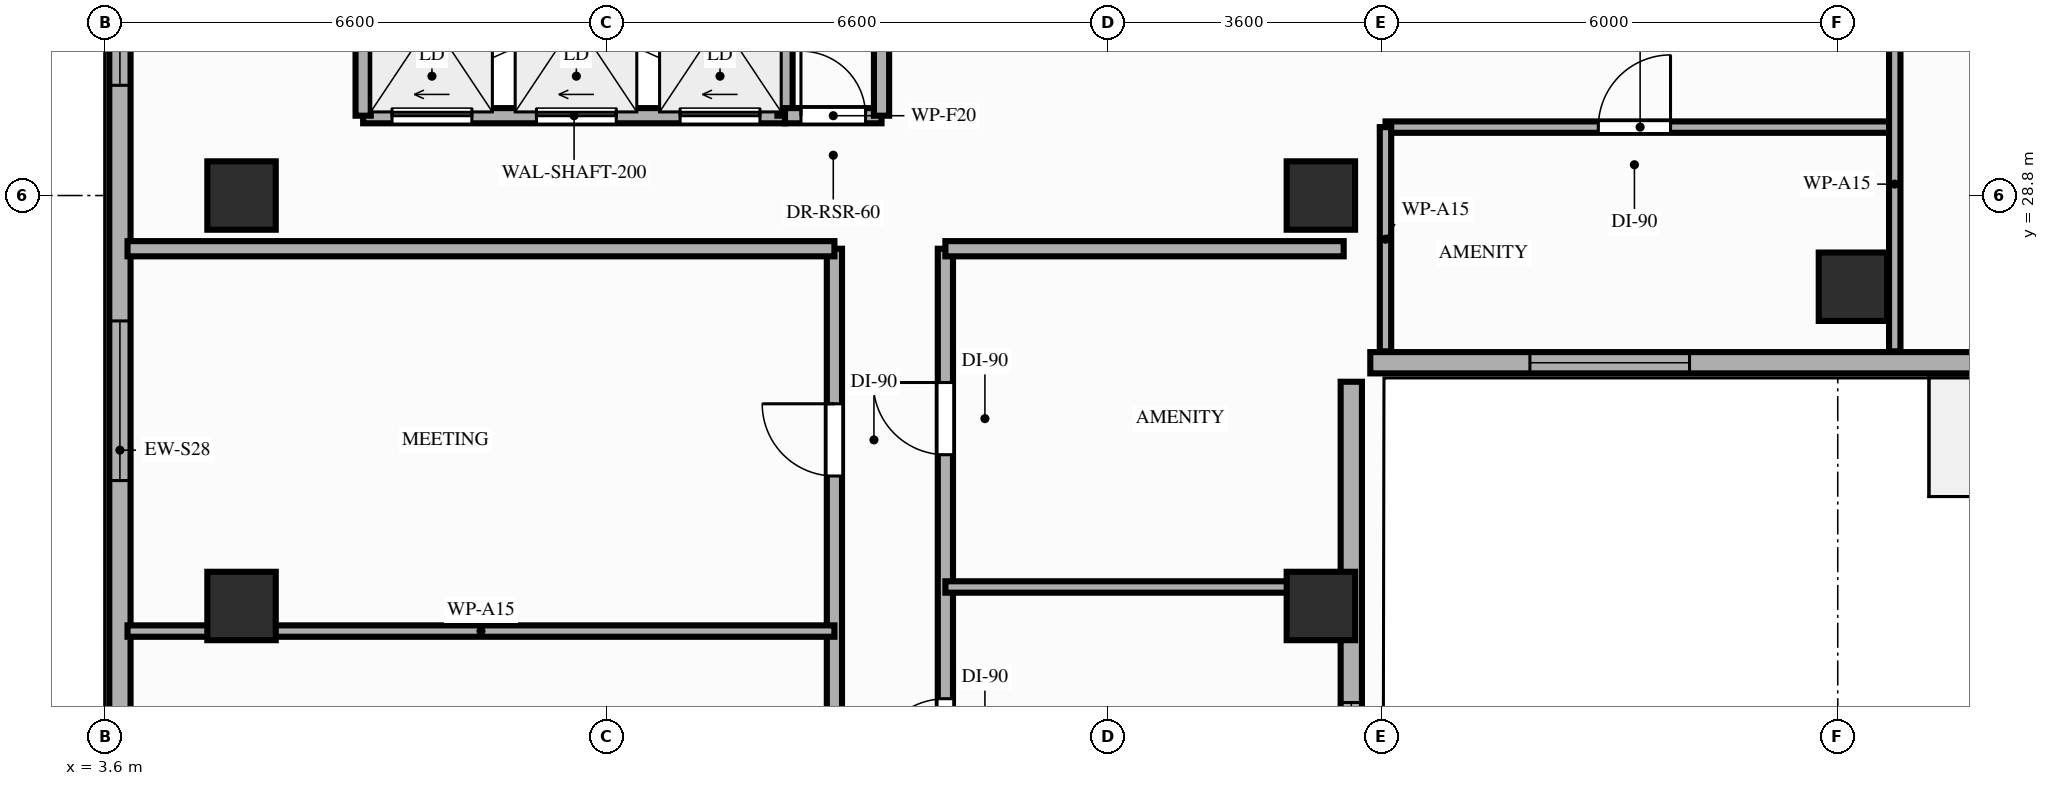
"""IFC4 building model, lengths in metres.
Left out: names, types, materials, properties, quantities, classifications, styles, units other than length and angle.
Written with IfcOpenShell. Run it as: python <this file> out.ifc"""

import sys

from ifc_helpers import new_model, si_unit, direction, frame, frame_2d, origin, origin_2d, place, context, subcontext, project, spatial, rectangle, extrude, element, fill, save


model = new_model("IFC4")
c1 = context("Model", 3, precision=1e-05, world=origin(), true_north=direction((0.0, 1.0)))
c2 = subcontext(c1, "Body", "Model", "MODEL_VIEW")
j1 = project(units=[si_unit("LENGTHUNIT", "METRE"), si_unit("PLANEANGLEUNIT", "RADIAN")], contexts=[c1])
p1 = place(None, origin())
s1 = spatial("IfcSite", under=j1, at=p1, CompositionType="ELEMENT")
p2 = place(p1, origin())
s2 = spatial("IfcBuilding", under=s1, at=p2, CompositionType="ELEMENT")
p3 = place(p2, frame((0.0, 0.0, 201.6)))
s3 = spatial("IfcBuildingStorey", under=s2, at=p3, CompositionType="ELEMENT", Elevation=201.6)
for number, where, z_axis, x_axis in (
    (1, (5.4, 23.4, 0.0), (0.0, 0.0, 1.0), (1.0, 0.0, 0.0)),
    (2, (19.6, 23.4, 0.0), (0.0, 0.0, 1.0), (1.0, 0.0, 0.0)),
    (3, (5.4, 28.8, 0.0), (0.0, 0.0, 1.0), (1.0, 0.0, 0.0)),
    (4, (19.6, 28.8, 0.0), (0.0, 0.0, 1.0), (1.0, 0.0, 0.0)),
    (5, (26.6, 27.6, 0.0), (0.0, 0.0, 1.0), (1.0, 0.0, 0.0)),
):
    element("IfcColumn", number, at=place(p3, frame(where, z_axis=z_axis, x_axis=x_axis)), inside=s3, PredefinedType="COLUMN", context=c2, shape_type="SweptSolid", body=[
        extrude(rectangle(XDim=0.9, YDim=0.9, at=origin_2d()), origin(), (0.0, 0.0, 1.0), 3.2),
    ])
p4 = place(p3, frame((3.8, 42.1, 0.0), z_axis=(0.0, 0.0, 1.0), x_axis=(0.0, -1.0, 0.0)))
e6 = element("IfcWall", 6, at=p4, inside=s3, PredefinedType="STANDARD", context=c2, shape_type="SweptSolid", body=[
    extrude(rectangle(XDim=33.3, YDim=0.28, at=frame_2d((16.65, 0.0))), origin(), (0.0, 0.0, 1.0), 2.71),
])
p5 = place(p4, frame((20.75, 0.0, 0.0)))
e7 = element("IfcOpeningElement", 7, at=p5, cuts=e6, PredefinedType="OPENING", context=c2, shape_type="SweptSolid", body=[
    extrude(rectangle(XDim=1.3, YDim=2.08, at=frame_2d((0.65, 1.04))), frame((0.0, 0.15, 0.0), z_axis=(0.0, -1.0, 0.0), x_axis=(1.0, 0.0, 0.0)), (0.0, 0.0, 1.0), 0.3),
])
p6 = place(p4, frame((29.33, 0.0, 0.85)))
e8 = element("IfcOpeningElement", 8, at=p6, cuts=e6, PredefinedType="OPENING", context=c2, shape_type="SweptSolid", body=[
    extrude(rectangle(XDim=2.1, YDim=1.61, at=frame_2d((1.05, 0.805))), frame((0.0, 0.15, 0.0), z_axis=(0.0, -1.0, 0.0), x_axis=(1.0, 0.0, 0.0)), (0.0, 0.0, 1.0), 0.3),
])
p7 = place(p4, frame((25.25, 0.0, 0.85)))
e9 = element("IfcOpeningElement", 9, at=p7, cuts=e6, PredefinedType="OPENING", context=c2, shape_type="SweptSolid", body=[
    extrude(rectangle(XDim=2.1, YDim=1.61, at=frame_2d((1.05, 0.805))), frame((0.0, 0.15, 0.0), z_axis=(0.0, -1.0, 0.0), x_axis=(1.0, 0.0, 0.0)), (0.0, 0.0, 1.0), 0.3),
])
p8 = place(p4, frame((14.95, 0.0, 0.85)))
e10 = element("IfcOpeningElement", 10, at=p8, cuts=e6, PredefinedType="OPENING", context=c2, shape_type="SweptSolid", body=[
    extrude(rectangle(XDim=2.1, YDim=1.61, at=frame_2d((1.05, 0.805))), frame((0.0, 0.15, 0.0), z_axis=(0.0, -1.0, 0.0), x_axis=(1.0, 0.0, 0.0)), (0.0, 0.0, 1.0), 0.3),
])
p9 = place(p4, frame((9.75, 0.0, 0.85)))
e11 = element("IfcOpeningElement", 11, at=p9, cuts=e6, PredefinedType="OPENING", context=c2, shape_type="SweptSolid", body=[
    extrude(rectangle(XDim=2.1, YDim=1.61, at=frame_2d((1.05, 0.805))), frame((0.0, 0.15, 0.0), z_axis=(0.0, -1.0, 0.0), x_axis=(1.0, 0.0, 0.0)), (0.0, 0.0, 1.0), 0.3),
])
p10 = place(p4, frame((3.65, 0.0, 0.85)))
e12 = element("IfcOpeningElement", 12, at=p10, cuts=e6, PredefinedType="OPENING", context=c2, shape_type="SweptSolid", body=[
    extrude(rectangle(XDim=2.1, YDim=1.61, at=frame_2d((1.05, 0.805))), frame((0.0, 0.15, 0.0), z_axis=(0.0, -1.0, 0.0), x_axis=(1.0, 0.0, 0.0)), (0.0, 0.0, 1.0), 0.3),
])
p11 = place(p3, frame((20.0, 8.8, 0.0), z_axis=(0.0, 0.0, 1.0), x_axis=(0.0, 1.0, 0.0)))
e13 = element("IfcWall", 13, at=p11, inside=s3, PredefinedType="STANDARD", context=c2, shape_type="SweptSolid", body=[
    extrude(rectangle(XDim=17.55, YDim=0.28, at=frame_2d((8.775, 0.0))), origin(), (0.0, 0.0, 1.0), 2.51),
])
p12 = place(p11, frame((4.58, 0.0, 0.85)))
e14 = element("IfcOpeningElement", 14, at=p12, cuts=e13, PredefinedType="OPENING", context=c2, shape_type="SweptSolid", body=[
    extrude(rectangle(XDim=0.8, YDim=1.41, at=frame_2d((0.4, 0.705))), frame((0.0, 0.15, 0.0), z_axis=(0.0, -1.0, 0.0), x_axis=(1.0, 0.0, 0.0)), (0.0, 0.0, 1.0), 0.3),
])
p13 = place(p11, frame((5.95, 0.0, 0.85)))
e15 = element("IfcOpeningElement", 15, at=p13, cuts=e13, PredefinedType="OPENING", context=c2, shape_type="SweptSolid", body=[
    extrude(rectangle(XDim=1.6, YDim=1.41, at=frame_2d((0.8, 0.705))), frame((0.0, 0.15, 0.0), z_axis=(0.0, -1.0, 0.0), x_axis=(1.0, 0.0, 0.0)), (0.0, 0.0, 1.0), 0.3),
])
p14 = place(p11, frame((11.23, 0.0, 0.85)))
e16 = element("IfcOpeningElement", 16, at=p14, cuts=e13, PredefinedType="OPENING", context=c2, shape_type="SweptSolid", body=[
    extrude(rectangle(XDim=2.1, YDim=1.41, at=frame_2d((1.05, 0.705))), frame((0.0, 0.15, 0.0), z_axis=(0.0, -1.0, 0.0), x_axis=(1.0, 0.0, 0.0)), (0.0, 0.0, 1.0), 0.3),
])
p15 = place(p3, frame((20.25, 26.6, 0.0), z_axis=(0.0, 0.0, 1.0), x_axis=(1.0, 0.0, 0.0)))
e17 = element("IfcWall", 17, at=p15, inside=s3, PredefinedType="STANDARD", context=c2, shape_type="SweptSolid", body=[
    extrude(rectangle(XDim=21.35, YDim=0.28, at=frame_2d((10.675, 0.0))), origin(), (0.0, 0.0, 1.0), 3.02),
])
p16 = place(p15, frame((8.0, 0.0, 0.0)))
e18 = element("IfcOpeningElement", 18, at=p16, cuts=e17, PredefinedType="OPENING", context=c2, shape_type="SweptSolid", body=[
    extrude(rectangle(XDim=1.3, YDim=2.08, at=frame_2d((0.65, 1.04))), frame((0.0, 0.15, 0.0), z_axis=(0.0, -1.0, 0.0), x_axis=(1.0, 0.0, 0.0)), (0.0, 0.0, 1.0), 0.3),
])
p17 = place(p15, frame((18.43, 0.0, 0.85)))
e19 = element("IfcOpeningElement", 19, at=p17, cuts=e17, PredefinedType="OPENING", context=c2, shape_type="SweptSolid", body=[
    extrude(rectangle(XDim=2.1, YDim=1.8, at=frame_2d((1.05, 0.9))), frame((0.0, 0.15, 0.0), z_axis=(0.0, -1.0, 0.0), x_axis=(1.0, 0.0, 0.0)), (0.0, 0.0, 1.0), 0.3),
])
p18 = place(p15, frame((2.1, 0.0, 0.85)))
e20 = element("IfcOpeningElement", 20, at=p18, cuts=e17, PredefinedType="OPENING", context=c2, shape_type="SweptSolid", body=[
    extrude(rectangle(XDim=2.1, YDim=1.8, at=frame_2d((1.05, 0.9))), frame((0.0, 0.15, 0.0), z_axis=(0.0, -1.0, 0.0), x_axis=(1.0, 0.0, 0.0)), (0.0, 0.0, 1.0), 0.3),
])
p19 = place(p3, frame((7.0, 29.85, 0.0), z_axis=(0.0, 0.0, 1.0), x_axis=(1.0, 0.0, 0.0)))
e21 = element("IfcWall", 21, at=p19, inside=s3, PredefinedType="MOVABLE", context=c2, shape_type="SweptSolid", body=[
    extrude(rectangle(XDim=5.55, YDim=0.2, at=frame_2d((2.775, 0.0))), origin(), (0.0, 0.0, 1.0), 3.02),
])
p20 = place(p19, frame((0.38, 0.0, 0.0)))
e22 = element("IfcOpeningElement", 22, at=p20, cuts=e21, PredefinedType="OPENING", context=c2, shape_type="SweptSolid", body=[
    extrude(rectangle(XDim=1.05, YDim=2.15, at=frame_2d((0.525, 1.075))), frame((0.0, 0.11, 0.0), z_axis=(0.0, -1.0, 0.0), x_axis=(1.0, 0.0, 0.0)), (0.0, 0.0, 1.0), 0.22),
])
p21 = place(p19, frame((2.28, 0.0, 0.0)))
e23 = element("IfcOpeningElement", 23, at=p21, cuts=e21, PredefinedType="OPENING", context=c2, shape_type="SweptSolid", body=[
    extrude(rectangle(XDim=1.05, YDim=2.15, at=frame_2d((0.525, 1.075))), frame((0.0, 0.11, 0.0), z_axis=(0.0, -1.0, 0.0), x_axis=(1.0, 0.0, 0.0)), (0.0, 0.0, 1.0), 0.22),
])
p22 = place(p19, frame((4.17, 0.0, 0.0)))
e24 = element("IfcOpeningElement", 24, at=p22, cuts=e21, PredefinedType="OPENING", context=c2, shape_type="SweptSolid", body=[
    extrude(rectangle(XDim=1.05, YDim=2.15, at=frame_2d((0.525, 1.075))), frame((0.0, 0.11, 0.0), z_axis=(0.0, -1.0, 0.0), x_axis=(1.0, 0.0, 0.0)), (0.0, 0.0, 1.0), 0.22),
])
for number, where, z_axis, x_axis in (
    (25, (7.0, 29.85, 0.0), (0.0, 0.0, 1.0), (0.0, 1.0, 0.0)),
    (26, (12.55, 29.85, 0.0), (0.0, 0.0, 1.0), (0.0, 1.0, 0.0)),
):
    element("IfcWall", number, at=place(p3, frame(where, z_axis=z_axis, x_axis=x_axis)), inside=s3, PredefinedType="MOVABLE", context=c2, shape_type="SweptSolid", body=[
        extrude(rectangle(XDim=2.5, YDim=0.2, at=frame_2d((1.25, 0.0))), origin(), (0.0, 0.0, 1.0), 3.02),
    ])
p23 = place(p3, frame((12.55, 29.85, 0.0), z_axis=(0.0, 0.0, 1.0), x_axis=(1.0, 0.0, 0.0)))
e27 = element("IfcWall", 27, at=p23, inside=s3, PredefinedType="PARTITIONING", context=c2, shape_type="SweptSolid", body=[
    extrude(rectangle(XDim=1.27, YDim=0.2, at=frame_2d((0.635, 0.0))), origin(), (0.0, 0.0, 1.0), 3.02),
])
p24 = place(p23, frame((0.21, 0.0, 0.0)))
e28 = element("IfcOpeningElement", 28, at=p24, cuts=e27, PredefinedType="OPENING", context=c2, shape_type="SweptSolid", body=[
    extrude(rectangle(XDim=0.85, YDim=2.05, at=frame_2d((0.425, 1.025))), frame((0.0, 0.11, 0.0), z_axis=(0.0, -1.0, 0.0), x_axis=(1.0, 0.0, 0.0)), (0.0, 0.0, 1.0), 0.22),
])
p25 = place(p3, frame((13.82, 29.85, 0.0), z_axis=(0.0, 0.0, 1.0), x_axis=(0.0, 1.0, 0.0)))
e29 = element("IfcWall", 29, at=p25, inside=s3, PredefinedType="PARTITIONING", context=c2, shape_type="SweptSolid", body=[
    extrude(rectangle(XDim=2.5, YDim=0.2, at=frame_2d((1.25, 0.0))), origin(), (0.0, 0.0, 1.0), 3.02),
])
p26 = place(p3, frame((13.2, 14.5, 0.0), z_axis=(0.0, 0.0, 1.0), x_axis=(0.0, 1.0, 0.0)))
e30 = element("IfcWall", 30, at=p26, inside=s3, PredefinedType="PARTITIONING", context=c2, shape_type="SweptSolid", body=[
    extrude(rectangle(XDim=13.6, YDim=0.2, at=frame_2d((6.8, 0.0))), origin(), (0.0, 0.0, 1.0), 2.51),
])
p27 = place(p26, frame((3.81, 0.0, 0.0)))
e31 = element("IfcOpeningElement", 31, at=p27, cuts=e30, PredefinedType="OPENING", context=c2, shape_type="SweptSolid", body=[
    extrude(rectangle(XDim=0.95, YDim=2.15, at=frame_2d((0.475, 1.075))), frame((0.0, 0.11, 0.0), z_axis=(0.0, -1.0, 0.0), x_axis=(1.0, 0.0, 0.0)), (0.0, 0.0, 1.0), 0.22),
])
p28 = place(p26, frame((10.61, 0.0, 0.0)))
e32 = element("IfcOpeningElement", 32, at=p28, cuts=e30, PredefinedType="OPENING", context=c2, shape_type="SweptSolid", body=[
    extrude(rectangle(XDim=0.95, YDim=2.15, at=frame_2d((0.475, 1.075))), frame((0.0, 0.11, 0.0), z_axis=(0.0, -1.0, 0.0), x_axis=(1.0, 0.0, 0.0)), (0.0, 0.0, 1.0), 0.22),
])
p29 = place(p3, frame((14.66, 14.5, 0.0), z_axis=(0.0, 0.0, 1.0), x_axis=(0.0, 1.0, 0.0)))
e33 = element("IfcWall", 33, at=p29, inside=s3, PredefinedType="PARTITIONING", context=c2, shape_type="SweptSolid", body=[
    extrude(rectangle(XDim=13.6, YDim=0.2, at=frame_2d((6.8, 0.0))), origin(), (0.0, 0.0, 1.0), 2.51),
])
p30 = place(p29, frame((0.42, 0.0, 0.0)))
e34 = element("IfcOpeningElement", 34, at=p30, cuts=e33, PredefinedType="OPENING", context=c2, shape_type="SweptSolid", body=[
    extrude(rectangle(XDim=0.95, YDim=2.1, at=frame_2d((0.475, 1.05))), frame((0.0, 0.11, 0.0), z_axis=(0.0, -1.0, 0.0), x_axis=(1.0, 0.0, 0.0)), (0.0, 0.0, 1.0), 0.22),
])
p31 = place(p29, frame((3.26, 0.0, 0.0)))
e35 = element("IfcOpeningElement", 35, at=p31, cuts=e33, PredefinedType="OPENING", context=c2, shape_type="SweptSolid", body=[
    extrude(rectangle(XDim=0.95, YDim=2.15, at=frame_2d((0.475, 1.075))), frame((0.0, 0.11, 0.0), z_axis=(0.0, -1.0, 0.0), x_axis=(1.0, 0.0, 0.0)), (0.0, 0.0, 1.0), 0.22),
])
p32 = place(p29, frame((6.73, 0.0, 0.0)))
e36 = element("IfcOpeningElement", 36, at=p32, cuts=e33, PredefinedType="OPENING", context=c2, shape_type="SweptSolid", body=[
    extrude(rectangle(XDim=0.95, YDim=2.15, at=frame_2d((0.475, 1.075))), frame((0.0, 0.11, 0.0), z_axis=(0.0, -1.0, 0.0), x_axis=(1.0, 0.0, 0.0)), (0.0, 0.0, 1.0), 0.22),
])
p33 = place(p29, frame((10.89, 0.0, 0.0)))
e37 = element("IfcOpeningElement", 37, at=p33, cuts=e33, PredefinedType="OPENING", context=c2, shape_type="SweptSolid", body=[
    extrude(rectangle(XDim=0.95, YDim=2.15, at=frame_2d((0.475, 1.075))), frame((0.0, 0.11, 0.0), z_axis=(0.0, -1.0, 0.0), x_axis=(1.0, 0.0, 0.0)), (0.0, 0.0, 1.0), 0.22),
])
p34 = place(p3, frame((3.9, 28.1, 0.0), z_axis=(0.0, 0.0, 1.0), x_axis=(1.0, 0.0, 0.0)))
e38 = element("IfcWall", 38, at=p34, inside=s3, PredefinedType="PARTITIONING", context=c2, shape_type="SweptSolid", body=[
    extrude(rectangle(XDim=9.3, YDim=0.2, at=frame_2d((4.65, 0.0))), origin(), (0.0, 0.0, 1.0), 2.51),
])
p35 = place(p3, frame((14.66, 28.1, 0.0), z_axis=(0.0, 0.0, 1.0), x_axis=(1.0, 0.0, 0.0)))
e39 = element("IfcWall", 39, at=p35, inside=s3, PredefinedType="PARTITIONING", context=c2, shape_type="SweptSolid", body=[
    extrude(rectangle(XDim=5.24, YDim=0.2, at=frame_2d((2.62, 0.0))), origin(), (0.0, 0.0, 1.0), 2.51),
])
p36 = place(p3, frame((20.45, 29.7, 0.0), z_axis=(0.0, 0.0, 1.0), x_axis=(1.0, 0.0, 0.0)))
e40 = element("IfcWall", 40, at=p36, inside=s3, PredefinedType="PARTITIONING", context=c2, shape_type="SweptSolid", body=[
    extrude(rectangle(XDim=6.7, YDim=0.15, at=frame_2d((3.35, 0.0))), origin(), (0.0, 0.0, 1.0), 3.02),
])
p37 = place(p36, frame((2.8, 0.0, 0.0)))
e41 = element("IfcOpeningElement", 41, at=p37, cuts=e40, PredefinedType="OPENING", context=c2, shape_type="SweptSolid", body=[
    extrude(rectangle(XDim=0.95, YDim=2.15, at=frame_2d((0.475, 1.075))), frame((0.0, 0.085, 0.0), z_axis=(0.0, -1.0, 0.0), x_axis=(1.0, 0.0, 0.0)), (0.0, 0.0, 1.0), 0.17),
])
p38 = place(p3, frame((20.45, 26.75, 0.0), z_axis=(0.0, 0.0, 1.0), x_axis=(0.0, 1.0, 0.0)))
e42 = element("IfcWall", 42, at=p38, inside=s3, PredefinedType="PARTITIONING", context=c2, shape_type="SweptSolid", body=[
    extrude(rectangle(XDim=2.95, YDim=0.15, at=frame_2d((1.475, 0.0))), origin(), (0.0, 0.0, 1.0), 2.47),
])
p39 = place(p3, frame((27.15, 26.75, 0.0), z_axis=(0.0, 0.0, 1.0), x_axis=(0.0, 1.0, 0.0)))
e43 = element("IfcWall", 43, at=p39, inside=s3, PredefinedType="PARTITIONING", context=c2, shape_type="SweptSolid", body=[
    extrude(rectangle(XDim=4.4, YDim=0.15, at=frame_2d((2.2, 0.0))), origin(), (0.0, 0.0, 1.0), 2.47),
])
p40 = place(p3, frame((3.9, 23.07, 0.0), z_axis=(0.0, 0.0, 1.0), x_axis=(1.0, 0.0, 0.0)))
e44 = element("IfcWall", 44, at=p40, inside=s3, PredefinedType="PARTITIONING", context=c2, shape_type="SweptSolid", body=[
    extrude(rectangle(XDim=9.3, YDim=0.15, at=frame_2d((4.65, 0.0))), origin(), (0.0, 0.0, 1.0), 2.51),
])
p41 = place(p3, frame((14.66, 23.65, 0.0), z_axis=(0.0, 0.0, 1.0), x_axis=(1.0, 0.0, 0.0)))
e45 = element("IfcWall", 45, at=p41, inside=s3, PredefinedType="PARTITIONING", context=c2, shape_type="SweptSolid", body=[
    extrude(rectangle(XDim=5.24, YDim=0.15, at=frame_2d((2.62, 0.0))), origin(), (0.0, 0.0, 1.0), 2.51),
])
p42 = place(p8, origin())
e46 = element("IfcWindow", 46, at=p42, inside=s3, PartitioningType="SINGLE_PANEL", PredefinedType="WINDOW", context=c2, shape_type="SweptSolid", body=[
    extrude(rectangle(XDim=2.1, YDim=1.61, at=frame_2d((1.05, 0.805))), frame((0.0, 0.03, 0.0), z_axis=(0.0, -1.0, 0.0), x_axis=(1.0, 0.0, 0.0)), (0.0, 0.0, 1.0), 0.06),
])
fill(e10, e46)
p43 = place(p9, origin())
e47 = element("IfcWindow", 47, at=p43, inside=s3, PartitioningType="SINGLE_PANEL", PredefinedType="WINDOW", context=c2, shape_type="SweptSolid", body=[
    extrude(rectangle(XDim=2.1, YDim=1.61, at=frame_2d((1.05, 0.805))), frame((0.0, 0.03, 0.0), z_axis=(0.0, -1.0, 0.0), x_axis=(1.0, 0.0, 0.0)), (0.0, 0.0, 1.0), 0.06),
])
fill(e11, e47)
p44 = place(p14, origin())
e48 = element("IfcWindow", 48, at=p44, inside=s3, PartitioningType="SINGLE_PANEL", PredefinedType="WINDOW", context=c2, shape_type="SweptSolid", body=[
    extrude(rectangle(XDim=2.1, YDim=1.41, at=frame_2d((1.05, 0.705))), frame((0.0, 0.03, 0.0), z_axis=(0.0, -1.0, 0.0), x_axis=(1.0, 0.0, 0.0)), (0.0, 0.0, 1.0), 0.06),
])
fill(e16, e48)
p45 = place(p18, origin())
e49 = element("IfcWindow", 49, at=p45, inside=s3, PartitioningType="SINGLE_PANEL", PredefinedType="WINDOW", context=c2, shape_type="SweptSolid", body=[
    extrude(rectangle(XDim=2.1, YDim=1.8, at=frame_2d((1.05, 0.9))), frame((0.0, 0.03, 0.0), z_axis=(0.0, -1.0, 0.0), x_axis=(1.0, 0.0, 0.0)), (0.0, 0.0, 1.0), 0.06),
])
fill(e20, e49)
p46 = place(p20, origin())
e50 = element("IfcDoor", 50, at=p46, inside=s3, OperationType="SLIDING_TO_LEFT", PredefinedType="DOOR", context=c2, shape_type="SweptSolid", body=[
    extrude(rectangle(XDim=1.05, YDim=2.15, at=frame_2d((0.525, 1.075))), frame((0.0, 0.025, 0.0), z_axis=(0.0, -1.0, 0.0), x_axis=(1.0, 0.0, 0.0)), (0.0, 0.0, 1.0), 0.05),
])
fill(e22, e50)
p47 = place(p21, origin())
e51 = element("IfcDoor", 51, at=p47, inside=s3, OperationType="SLIDING_TO_LEFT", PredefinedType="DOOR", context=c2, shape_type="SweptSolid", body=[
    extrude(rectangle(XDim=1.05, YDim=2.15, at=frame_2d((0.525, 1.075))), frame((0.0, 0.025, 0.0), z_axis=(0.0, -1.0, 0.0), x_axis=(1.0, 0.0, 0.0)), (0.0, 0.0, 1.0), 0.05),
])
fill(e23, e51)
p48 = place(p22, origin())
e52 = element("IfcDoor", 52, at=p48, inside=s3, OperationType="SLIDING_TO_LEFT", PredefinedType="DOOR", context=c2, shape_type="SweptSolid", body=[
    extrude(rectangle(XDim=1.05, YDim=2.15, at=frame_2d((0.525, 1.075))), frame((0.0, 0.025, 0.0), z_axis=(0.0, -1.0, 0.0), x_axis=(1.0, 0.0, 0.0)), (0.0, 0.0, 1.0), 0.05),
])
fill(e24, e52)
p49 = place(p24, origin())
e53 = element("IfcDoor", 53, at=p49, inside=s3, OperationType="SINGLE_SWING_LEFT", PredefinedType="DOOR", context=c2, shape_type="SweptSolid", body=[
    extrude(rectangle(XDim=0.85, YDim=2.05, at=frame_2d((0.425, 1.025))), frame((0.0, 0.025, 0.0), z_axis=(0.0, -1.0, 0.0), x_axis=(1.0, 0.0, 0.0)), (0.0, 0.0, 1.0), 0.05),
])
fill(e28, e53)
p50 = place(p37, origin())
e54 = element("IfcDoor", 54, at=p50, inside=s3, OperationType="SINGLE_SWING_RIGHT", PredefinedType="DOOR", context=c2, shape_type="SweptSolid", body=[
    extrude(rectangle(XDim=0.95, YDim=2.15, at=frame_2d((0.475, 1.075))), frame((0.0, 0.025, 0.0), z_axis=(0.0, -1.0, 0.0), x_axis=(1.0, 0.0, 0.0)), (0.0, 0.0, 1.0), 0.05),
])
fill(e41, e54)
p51 = place(p28, origin())
e55 = element("IfcDoor", 55, at=p51, inside=s3, OperationType="SINGLE_SWING_RIGHT", PredefinedType="DOOR", context=c2, shape_type="SweptSolid", body=[
    extrude(rectangle(XDim=0.95, YDim=2.15, at=frame_2d((0.475, 1.075))), frame((0.0, 0.025, 0.0), z_axis=(0.0, -1.0, 0.0), x_axis=(1.0, 0.0, 0.0)), (0.0, 0.0, 1.0), 0.05),
])
fill(e32, e55)
p52 = place(p32, origin())
e56 = element("IfcDoor", 56, at=p52, inside=s3, OperationType="SINGLE_SWING_LEFT", PredefinedType="DOOR", context=c2, shape_type="SweptSolid", body=[
    extrude(rectangle(XDim=0.95, YDim=2.15, at=frame_2d((0.475, 1.075))), frame((0.0, 0.025, 0.0), z_axis=(0.0, -1.0, 0.0), x_axis=(1.0, 0.0, 0.0)), (0.0, 0.0, 1.0), 0.05),
])
fill(e36, e56)
p53 = place(p33, origin())
e57 = element("IfcDoor", 57, at=p53, inside=s3, OperationType="SINGLE_SWING_RIGHT", PredefinedType="DOOR", context=c2, shape_type="SweptSolid", body=[
    extrude(rectangle(XDim=0.95, YDim=2.15, at=frame_2d((0.475, 1.075))), frame((0.0, 0.025, 0.0), z_axis=(0.0, -1.0, 0.0), x_axis=(1.0, 0.0, 0.0)), (0.0, 0.0, 1.0), 0.05),
])
fill(e37, e57)
save(model, sys.argv[1])
